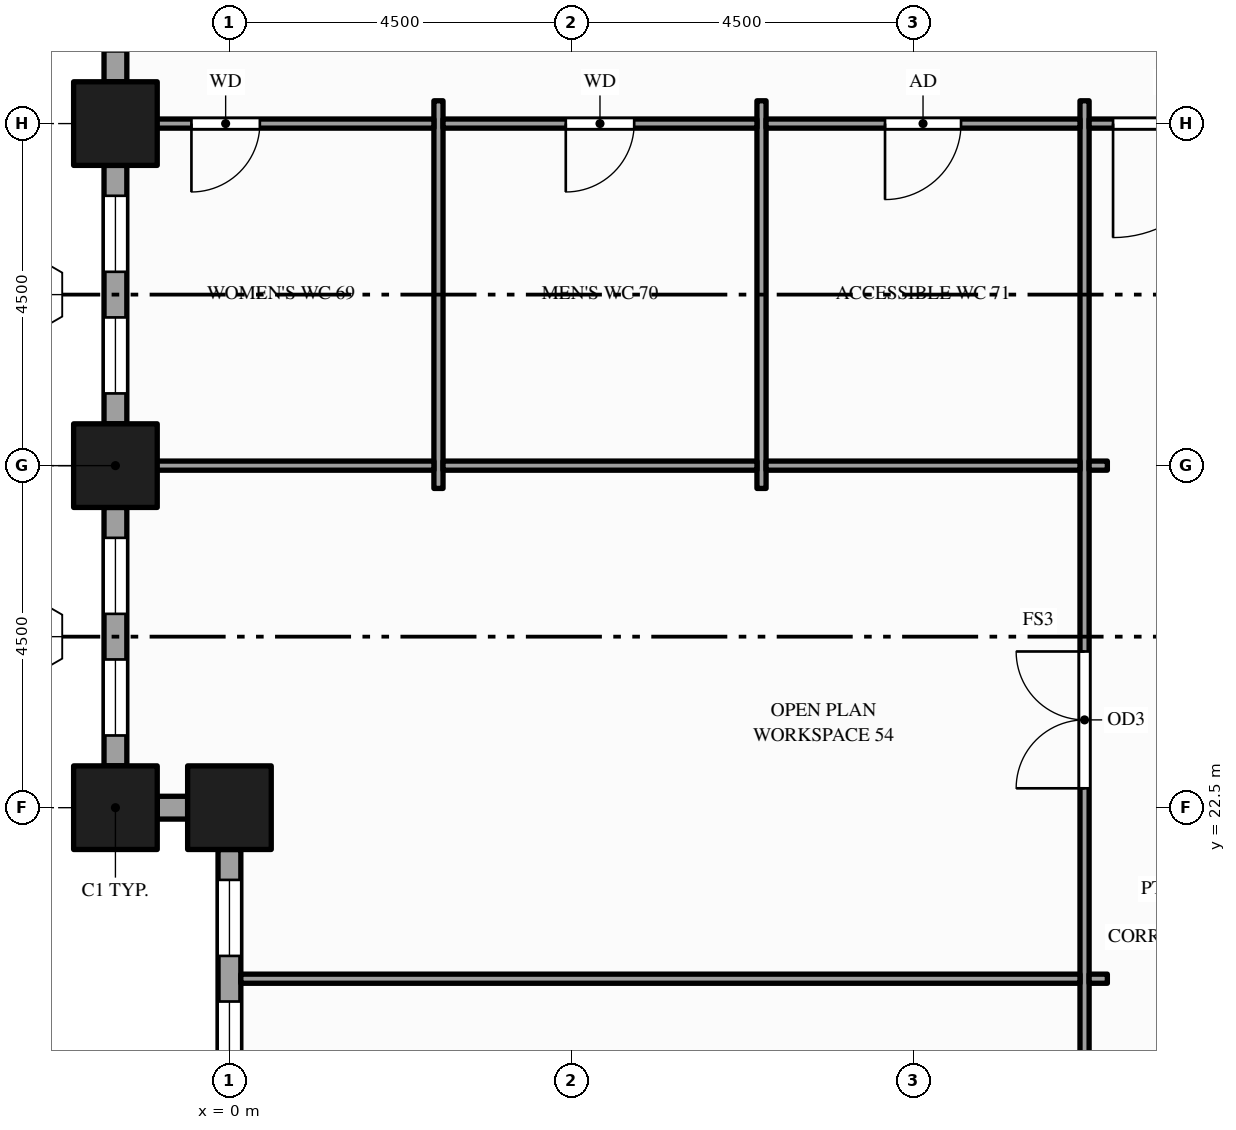
"""IFC4 building model, lengths in metres.
Left out: names, types, materials, properties, quantities, classifications, styles, units other than length and angle.
Written with IfcOpenShell. Run it as: python <this file> out.ifc"""

import sys

from ifc_helpers import new_model, si_unit, direction, frame, frame_2d, origin, origin_2d, place, context, subcontext, project, spatial, rectangle, hollow_rectangle, extrude, element, fill, save


model = new_model("IFC4")
c1 = context("Model", 3, precision=1e-05, world=origin(), true_north=direction((0.0, 1.0)))
c2 = subcontext(c1, "Body", "Model", "MODEL_VIEW")
j1 = project(units=[si_unit("LENGTHUNIT", "METRE"), si_unit("PLANEANGLEUNIT", "RADIAN")], contexts=[c1])
p1 = place(None, origin())
s1 = spatial("IfcSite", under=j1, at=p1, CompositionType="ELEMENT")
p2 = place(p1, origin())
s2 = spatial("IfcBuilding", under=s1, at=p2, CompositionType="ELEMENT")
p3 = place(p2, frame((0.0, 0.0, 49.0)))
s3 = spatial("IfcBuildingStorey", under=s2, at=p3, CompositionType="ELEMENT", Elevation=49.0)
for number, where, z_axis, x_axis in (
    (1, (-1.5, 22.5, -0.15), (0.0, 0.0, 1.0), (1.0, 0.0, 0.0)),
    (2, (-1.5, 27.0, -0.15), (0.0, 0.0, 1.0), (1.0, 0.0, 0.0)),
    (3, (-1.5, 31.5, -0.15), (0.0, 0.0, 1.0), (1.0, 0.0, 0.0)),
    (4, (0.0, 22.5, -0.15), (0.0, 0.0, 1.0), (1.0, 0.0, 0.0)),
):
    element("IfcColumn", number, at=place(p3, frame(where, z_axis=z_axis, x_axis=x_axis)), inside=s3, PredefinedType="COLUMN", context=c2, shape_type="SweptSolid", body=[
        extrude(hollow_rectangle(XDim=1.1, YDim=1.1, WallThickness=0.06, at=origin_2d()), origin(), (0.0, 0.0, 1.0), 4.0),
    ])
p4 = place(p3, frame((-1.5, 35.45, 0.0), z_axis=(0.0, 0.0, 1.0), x_axis=(0.0, -1.0, 0.0)))
e5 = element("IfcWall", 5, at=p4, inside=s3, PredefinedType="STANDARD", context=c2, shape_type="SweptSolid", body=[
    extrude(rectangle(XDim=3.4, YDim=0.3, at=frame_2d((1.7, 0.0))), origin(), (0.0, 0.0, 1.0), 3.144),
])
p5 = place(p4, frame((0.4, 0.0, 0.9)))
e6 = element("IfcOpeningElement", 6, at=p5, cuts=e5, PredefinedType="OPENING", context=c2, shape_type="SweptSolid", body=[
    extrude(rectangle(XDim=1.0, YDim=2.0, at=frame_2d((0.5, 1.0))), frame((0.0, 0.16, 0.0), z_axis=(0.0, -1.0, 0.0), x_axis=(1.0, 0.0, 0.0)), (0.0, 0.0, 1.0), 0.32),
])
p6 = place(p4, frame((2.0, 0.0, 0.9)))
e7 = element("IfcOpeningElement", 7, at=p6, cuts=e5, PredefinedType="OPENING", context=c2, shape_type="SweptSolid", body=[
    extrude(rectangle(XDim=1.0, YDim=2.0, at=frame_2d((0.5, 1.0))), frame((0.0, 0.16, 0.0), z_axis=(0.0, -1.0, 0.0), x_axis=(1.0, 0.0, 0.0)), (0.0, 0.0, 1.0), 0.32),
])
p7 = place(p3, frame((-1.5, 30.95, 0.0), z_axis=(0.0, 0.0, 1.0), x_axis=(0.0, -1.0, 0.0)))
e8 = element("IfcWall", 8, at=p7, inside=s3, PredefinedType="STANDARD", context=c2, shape_type="SweptSolid", body=[
    extrude(rectangle(XDim=3.4, YDim=0.3, at=frame_2d((1.7, 0.0))), origin(), (0.0, 0.0, 1.0), 3.144),
])
p8 = place(p7, frame((0.4, 0.0, 0.9)))
e9 = element("IfcOpeningElement", 9, at=p8, cuts=e8, PredefinedType="OPENING", context=c2, shape_type="SweptSolid", body=[
    extrude(rectangle(XDim=1.0, YDim=2.0, at=frame_2d((0.5, 1.0))), frame((0.0, 0.16, 0.0), z_axis=(0.0, -1.0, 0.0), x_axis=(1.0, 0.0, 0.0)), (0.0, 0.0, 1.0), 0.32),
])
p9 = place(p7, frame((2.0, 0.0, 0.9)))
e10 = element("IfcOpeningElement", 10, at=p9, cuts=e8, PredefinedType="OPENING", context=c2, shape_type="SweptSolid", body=[
    extrude(rectangle(XDim=1.0, YDim=2.0, at=frame_2d((0.5, 1.0))), frame((0.0, 0.16, 0.0), z_axis=(0.0, -1.0, 0.0), x_axis=(1.0, 0.0, 0.0)), (0.0, 0.0, 1.0), 0.32),
])
p10 = place(p3, frame((-1.5, 26.45, 0.0), z_axis=(0.0, 0.0, 1.0), x_axis=(0.0, -1.0, 0.0)))
e11 = element("IfcWall", 11, at=p10, inside=s3, PredefinedType="STANDARD", context=c2, shape_type="SweptSolid", body=[
    extrude(rectangle(XDim=3.4, YDim=0.3, at=frame_2d((1.7, 0.0))), origin(), (0.0, 0.0, 1.0), 3.144),
])
p11 = place(p10, frame((0.4, 0.0, 0.9)))
e12 = element("IfcOpeningElement", 12, at=p11, cuts=e11, PredefinedType="OPENING", context=c2, shape_type="SweptSolid", body=[
    extrude(rectangle(XDim=1.0, YDim=2.0, at=frame_2d((0.5, 1.0))), frame((0.0, 0.16, 0.0), z_axis=(0.0, -1.0, 0.0), x_axis=(1.0, 0.0, 0.0)), (0.0, 0.0, 1.0), 0.32),
])
p12 = place(p10, frame((2.0, 0.0, 0.9)))
e13 = element("IfcOpeningElement", 13, at=p12, cuts=e11, PredefinedType="OPENING", context=c2, shape_type="SweptSolid", body=[
    extrude(rectangle(XDim=1.0, YDim=2.0, at=frame_2d((0.5, 1.0))), frame((0.0, 0.16, 0.0), z_axis=(0.0, -1.0, 0.0), x_axis=(1.0, 0.0, 0.0)), (0.0, 0.0, 1.0), 0.32),
])
p13 = place(p3, frame((-0.95, 22.5, 0.0), z_axis=(0.0, 0.0, 1.0), x_axis=(1.0, 0.0, 0.0)))
e14 = element("IfcWall", 14, at=p13, inside=s3, PredefinedType="STANDARD", context=c2, shape_type="SweptSolid", body=[
    extrude(rectangle(XDim=0.4, YDim=0.3, at=frame_2d((0.2, 0.0))), origin(), (0.0, 0.0, 1.0), 3.144),
])
p14 = place(p3, frame((0.0, 21.95, 0.0), z_axis=(0.0, 0.0, 1.0), x_axis=(0.0, -1.0, 0.0)))
e15 = element("IfcWall", 15, at=p14, inside=s3, PredefinedType="STANDARD", context=c2, shape_type="SweptSolid", body=[
    extrude(rectangle(XDim=3.4, YDim=0.3, at=frame_2d((1.7, 0.0))), origin(), (0.0, 0.0, 1.0), 3.144),
])
p15 = place(p14, frame((0.4, 0.0, 0.9)))
e16 = element("IfcOpeningElement", 16, at=p15, cuts=e15, PredefinedType="OPENING", context=c2, shape_type="SweptSolid", body=[
    extrude(rectangle(XDim=1.0, YDim=2.0, at=frame_2d((0.5, 1.0))), frame((0.0, 0.16, 0.0), z_axis=(0.0, -1.0, 0.0), x_axis=(1.0, 0.0, 0.0)), (0.0, 0.0, 1.0), 0.32),
])
p16 = place(p14, frame((2.0, 0.0, 0.9)))
e17 = element("IfcOpeningElement", 17, at=p16, cuts=e15, PredefinedType="OPENING", context=c2, shape_type="SweptSolid", body=[
    extrude(rectangle(XDim=1.0, YDim=2.0, at=frame_2d((0.5, 1.0))), frame((0.0, 0.16, 0.0), z_axis=(0.0, -1.0, 0.0), x_axis=(1.0, 0.0, 0.0)), (0.0, 0.0, 1.0), 0.32),
])
for number, where, z_axis, x_axis in (
    (18, (2.75, 26.7, 0.0), (0.0, 0.0, 1.0), (0.0, 1.0, 0.0)),
    (19, (7.0, 26.7, 0.0), (0.0, 0.0, 1.0), (0.0, 1.0, 0.0)),
):
    element("IfcWall", number, at=place(p3, frame(where, z_axis=z_axis, x_axis=x_axis)), inside=s3, PredefinedType="PARTITIONING", context=c2, shape_type="SweptSolid", body=[
        extrude(rectangle(XDim=5.1, YDim=0.12, at=frame_2d((2.55, 0.0))), origin(), (0.0, 0.0, 1.0), 3.85),
    ])
p17 = place(p3, frame((11.25, 8.7, 0.0), z_axis=(0.0, 0.0, 1.0), x_axis=(0.0, 1.0, 0.0)))
e20 = element("IfcWall", 20, at=p17, inside=s3, PredefinedType="PARTITIONING", context=c2, shape_type="SweptSolid", body=[
    extrude(rectangle(XDim=23.1, YDim=0.12, at=frame_2d((11.55, 0.0))), origin(), (0.0, 0.0, 1.0), 2.6),
])
p18 = place(p17, frame((2.05, 0.0, 0.0)))
e21 = element("IfcOpeningElement", 21, at=p18, cuts=e20, PredefinedType="OPENING", context=c2, shape_type="SweptSolid", body=[
    extrude(rectangle(XDim=1.0, YDim=2.1, at=frame_2d((0.5, 1.05))), frame((0.0, 0.07, 0.0), z_axis=(0.0, -1.0, 0.0), x_axis=(1.0, 0.0, 0.0)), (0.0, 0.0, 1.0), 0.14),
])
p19 = place(p17, frame((7.675, 0.0, 0.0)))
e22 = element("IfcOpeningElement", 22, at=p19, cuts=e20, PredefinedType="OPENING", context=c2, shape_type="SweptSolid", body=[
    extrude(rectangle(XDim=1.0, YDim=2.1, at=frame_2d((0.5, 1.05))), frame((0.0, 0.07, 0.0), z_axis=(0.0, -1.0, 0.0), x_axis=(1.0, 0.0, 0.0)), (0.0, 0.0, 1.0), 0.14),
])
p20 = place(p17, frame((14.055, 0.0, 0.0)))
e23 = element("IfcOpeningElement", 23, at=p20, cuts=e20, PredefinedType="OPENING", context=c2, shape_type="SweptSolid", body=[
    extrude(rectangle(XDim=1.8, YDim=2.1, at=frame_2d((0.9, 1.05))), frame((0.0, 0.07, 0.0), z_axis=(0.0, -1.0, 0.0), x_axis=(1.0, 0.0, 0.0)), (0.0, 0.0, 1.0), 0.14),
])
p21 = place(p3, frame((0.15, 20.25, 0.0), z_axis=(0.0, 0.0, 1.0), x_axis=(1.0, 0.0, 0.0)))
e24 = element("IfcWall", 24, at=p21, inside=s3, PredefinedType="PARTITIONING", context=c2, shape_type="SweptSolid", body=[
    extrude(rectangle(XDim=11.04, YDim=0.12, at=frame_2d((5.52, 0.0))), origin(), (0.0, 0.0, 1.0), 2.938),
])
p22 = place(p3, frame((11.31, 20.25, 0.0), z_axis=(0.0, 0.0, 1.0), x_axis=(1.0, 0.0, 0.0)))
e25 = element("IfcWall", 25, at=p22, inside=s3, PredefinedType="PARTITIONING", context=c2, shape_type="SweptSolid", body=[
    extrude(rectangle(XDim=0.24, YDim=0.12, at=frame_2d((0.12, 0.0))), origin(), (0.0, 0.0, 1.0), 2.938),
])
p23 = place(p3, frame((-1.35, 27.0, 0.0), z_axis=(0.0, 0.0, 1.0), x_axis=(1.0, 0.0, 0.0)))
e26 = element("IfcWall", 26, at=p23, inside=s3, PredefinedType="PARTITIONING", context=c2, shape_type="SweptSolid", body=[
    extrude(rectangle(XDim=4.04, YDim=0.12, at=frame_2d((2.02, 0.0))), origin(), (0.0, 0.0, 1.0), 2.938),
])
for number, where, z_axis, x_axis in (
    (27, (2.81, 27.0, 0.0), (0.0, 0.0, 1.0), (1.0, 0.0, 0.0)),
    (28, (7.06, 27.0, 0.0), (0.0, 0.0, 1.0), (1.0, 0.0, 0.0)),
):
    element("IfcWall", number, at=place(p3, frame(where, z_axis=z_axis, x_axis=x_axis)), inside=s3, PredefinedType="PARTITIONING", context=c2, shape_type="SweptSolid", body=[
        extrude(rectangle(XDim=4.13, YDim=0.12, at=frame_2d((2.065, 0.0))), origin(), (0.0, 0.0, 1.0), 2.938),
    ])
p24 = place(p3, frame((11.31, 27.0, 0.0), z_axis=(0.0, 0.0, 1.0), x_axis=(1.0, 0.0, 0.0)))
e29 = element("IfcWall", 29, at=p24, inside=s3, PredefinedType="PARTITIONING", context=c2, shape_type="SweptSolid", body=[
    extrude(rectangle(XDim=0.24, YDim=0.12, at=frame_2d((0.12, 0.0))), origin(), (0.0, 0.0, 1.0), 2.938),
])
p25 = place(p3, frame((-1.35, 31.5, 0.0), z_axis=(0.0, 0.0, 1.0), x_axis=(1.0, 0.0, 0.0)))
e30 = element("IfcWall", 30, at=p25, inside=s3, PredefinedType="PARTITIONING", context=c2, shape_type="SweptSolid", body=[
    extrude(rectangle(XDim=4.04, YDim=0.12, at=frame_2d((2.02, 0.0))), origin(), (0.0, 0.0, 1.0), 2.938),
])
p26 = place(p25, frame((0.85, 0.0, 0.0)))
e31 = element("IfcOpeningElement", 31, at=p26, cuts=e30, PredefinedType="OPENING", context=c2, shape_type="SweptSolid", body=[
    extrude(rectangle(XDim=0.9, YDim=2.1, at=frame_2d((0.45, 1.05))), frame((0.0, 0.07, 0.0), z_axis=(0.0, -1.0, 0.0), x_axis=(1.0, 0.0, 0.0)), (0.0, 0.0, 1.0), 0.14),
])
p27 = place(p3, frame((2.81, 31.5, 0.0), z_axis=(0.0, 0.0, 1.0), x_axis=(1.0, 0.0, 0.0)))
e32 = element("IfcWall", 32, at=p27, inside=s3, PredefinedType="PARTITIONING", context=c2, shape_type="SweptSolid", body=[
    extrude(rectangle(XDim=4.13, YDim=0.12, at=frame_2d((2.065, 0.0))), origin(), (0.0, 0.0, 1.0), 2.938),
])
p28 = place(p27, frame((1.615, 0.0, 0.0)))
e33 = element("IfcOpeningElement", 33, at=p28, cuts=e32, PredefinedType="OPENING", context=c2, shape_type="SweptSolid", body=[
    extrude(rectangle(XDim=0.9, YDim=2.1, at=frame_2d((0.45, 1.05))), frame((0.0, 0.07, 0.0), z_axis=(0.0, -1.0, 0.0), x_axis=(1.0, 0.0, 0.0)), (0.0, 0.0, 1.0), 0.14),
])
p29 = place(p3, frame((7.06, 31.5, 0.0), z_axis=(0.0, 0.0, 1.0), x_axis=(1.0, 0.0, 0.0)))
e34 = element("IfcWall", 34, at=p29, inside=s3, PredefinedType="PARTITIONING", context=c2, shape_type="SweptSolid", body=[
    extrude(rectangle(XDim=4.13, YDim=0.12, at=frame_2d((2.065, 0.0))), origin(), (0.0, 0.0, 1.0), 2.938),
])
p30 = place(p29, frame((1.565, 0.0, 0.0)))
e35 = element("IfcOpeningElement", 35, at=p30, cuts=e34, PredefinedType="OPENING", context=c2, shape_type="SweptSolid", body=[
    extrude(rectangle(XDim=1.0, YDim=2.1, at=frame_2d((0.5, 1.05))), frame((0.0, 0.07, 0.0), z_axis=(0.0, -1.0, 0.0), x_axis=(1.0, 0.0, 0.0)), (0.0, 0.0, 1.0), 0.14),
])
p31 = place(p3, frame((11.31, 31.5, 0.0), z_axis=(0.0, 0.0, 1.0), x_axis=(1.0, 0.0, 0.0)))
e36 = element("IfcWall", 36, at=p31, inside=s3, PredefinedType="PARTITIONING", context=c2, shape_type="SweptSolid", body=[
    extrude(rectangle(XDim=2.13, YDim=0.12, at=frame_2d((1.065, 0.0))), origin(), (0.0, 0.0, 1.0), 2.938),
])
p32 = place(p31, frame((0.315, 0.0, 0.0)))
e37 = element("IfcOpeningElement", 37, at=p32, cuts=e36, PredefinedType="OPENING", context=c2, shape_type="SweptSolid", body=[
    extrude(rectangle(XDim=1.5, YDim=2.1, at=frame_2d((0.75, 1.05))), frame((0.0, 0.07, 0.0), z_axis=(0.0, -1.0, 0.0), x_axis=(1.0, 0.0, 0.0)), (0.0, 0.0, 1.0), 0.14),
])
p33 = place(p8, origin())
e38 = element("IfcWindow", 38, at=p33, inside=s3, PartitioningType="SINGLE_PANEL", PredefinedType="WINDOW", context=c2, shape_type="SweptSolid", body=[
    extrude(rectangle(XDim=1.0, YDim=2.0, at=frame_2d((0.5, 1.0))), frame((0.0, 0.03, 0.0), z_axis=(0.0, -1.0, 0.0), x_axis=(1.0, 0.0, 0.0)), (0.0, 0.0, 1.0), 0.06),
])
fill(e9, e38)
p34 = place(p9, origin())
e39 = element("IfcWindow", 39, at=p34, inside=s3, PartitioningType="SINGLE_PANEL", PredefinedType="WINDOW", context=c2, shape_type="SweptSolid", body=[
    extrude(rectangle(XDim=1.0, YDim=2.0, at=frame_2d((0.5, 1.0))), frame((0.0, 0.03, 0.0), z_axis=(0.0, -1.0, 0.0), x_axis=(1.0, 0.0, 0.0)), (0.0, 0.0, 1.0), 0.06),
])
fill(e10, e39)
p35 = place(p11, origin())
e40 = element("IfcWindow", 40, at=p35, inside=s3, PartitioningType="SINGLE_PANEL", PredefinedType="WINDOW", context=c2, shape_type="SweptSolid", body=[
    extrude(rectangle(XDim=1.0, YDim=2.0, at=frame_2d((0.5, 1.0))), frame((0.0, 0.03, 0.0), z_axis=(0.0, -1.0, 0.0), x_axis=(1.0, 0.0, 0.0)), (0.0, 0.0, 1.0), 0.06),
])
fill(e12, e40)
p36 = place(p12, origin())
e41 = element("IfcWindow", 41, at=p36, inside=s3, PartitioningType="SINGLE_PANEL", PredefinedType="WINDOW", context=c2, shape_type="SweptSolid", body=[
    extrude(rectangle(XDim=1.0, YDim=2.0, at=frame_2d((0.5, 1.0))), frame((0.0, 0.03, 0.0), z_axis=(0.0, -1.0, 0.0), x_axis=(1.0, 0.0, 0.0)), (0.0, 0.0, 1.0), 0.06),
])
fill(e13, e41)
p37 = place(p15, origin())
e42 = element("IfcWindow", 42, at=p37, inside=s3, PartitioningType="SINGLE_PANEL", PredefinedType="WINDOW", context=c2, shape_type="SweptSolid", body=[
    extrude(rectangle(XDim=1.0, YDim=2.0, at=frame_2d((0.5, 1.0))), frame((0.0, 0.03, 0.0), z_axis=(0.0, -1.0, 0.0), x_axis=(1.0, 0.0, 0.0)), (0.0, 0.0, 1.0), 0.06),
])
fill(e16, e42)
p38 = place(p16, origin())
e43 = element("IfcWindow", 43, at=p38, inside=s3, PartitioningType="SINGLE_PANEL", PredefinedType="WINDOW", context=c2, shape_type="SweptSolid", body=[
    extrude(rectangle(XDim=1.0, YDim=2.0, at=frame_2d((0.5, 1.0))), frame((0.0, 0.03, 0.0), z_axis=(0.0, -1.0, 0.0), x_axis=(1.0, 0.0, 0.0)), (0.0, 0.0, 1.0), 0.06),
])
fill(e17, e43)
p39 = place(p32, origin())
e44 = element("IfcDoor", 44, at=p39, inside=s3, OperationType="SINGLE_SWING_LEFT", PredefinedType="DOOR", context=c2, shape_type="SweptSolid", body=[
    extrude(rectangle(XDim=1.5, YDim=2.1, at=frame_2d((0.75, 1.05))), frame((0.0, 0.025, 0.0), z_axis=(0.0, -1.0, 0.0), x_axis=(1.0, 0.0, 0.0)), (0.0, 0.0, 1.0), 0.05),
])
fill(e37, e44)
p40 = place(p20, origin())
e45 = element("IfcDoor", 45, at=p40, inside=s3, OperationType="DOUBLE_DOOR_SINGLE_SWING", PredefinedType="DOOR", context=c2, shape_type="SweptSolid", body=[
    extrude(rectangle(XDim=1.8, YDim=2.1, at=frame_2d((0.9, 1.05))), frame((0.0, 0.025, 0.0), z_axis=(0.0, -1.0, 0.0), x_axis=(1.0, 0.0, 0.0)), (0.0, 0.0, 1.0), 0.05),
])
fill(e23, e45)
p41 = place(p26, origin())
e46 = element("IfcDoor", 46, at=p41, inside=s3, OperationType="SINGLE_SWING_LEFT", PredefinedType="DOOR", context=c2, shape_type="SweptSolid", body=[
    extrude(rectangle(XDim=0.9, YDim=2.1, at=frame_2d((0.45, 1.05))), frame((0.0, 0.025, 0.0), z_axis=(0.0, -1.0, 0.0), x_axis=(1.0, 0.0, 0.0)), (0.0, 0.0, 1.0), 0.05),
])
fill(e31, e46)
p42 = place(p28, origin())
e47 = element("IfcDoor", 47, at=p42, inside=s3, OperationType="SINGLE_SWING_LEFT", PredefinedType="DOOR", context=c2, shape_type="SweptSolid", body=[
    extrude(rectangle(XDim=0.9, YDim=2.1, at=frame_2d((0.45, 1.05))), frame((0.0, 0.025, 0.0), z_axis=(0.0, -1.0, 0.0), x_axis=(1.0, 0.0, 0.0)), (0.0, 0.0, 1.0), 0.05),
])
fill(e33, e47)
p43 = place(p30, origin())
e48 = element("IfcDoor", 48, at=p43, inside=s3, OperationType="SINGLE_SWING_LEFT", PredefinedType="DOOR", context=c2, shape_type="SweptSolid", body=[
    extrude(rectangle(XDim=1.0, YDim=2.1, at=frame_2d((0.5, 1.05))), frame((0.0, 0.025, 0.0), z_axis=(0.0, -1.0, 0.0), x_axis=(1.0, 0.0, 0.0)), (0.0, 0.0, 1.0), 0.05),
])
fill(e35, e48)
save(model, sys.argv[1])
